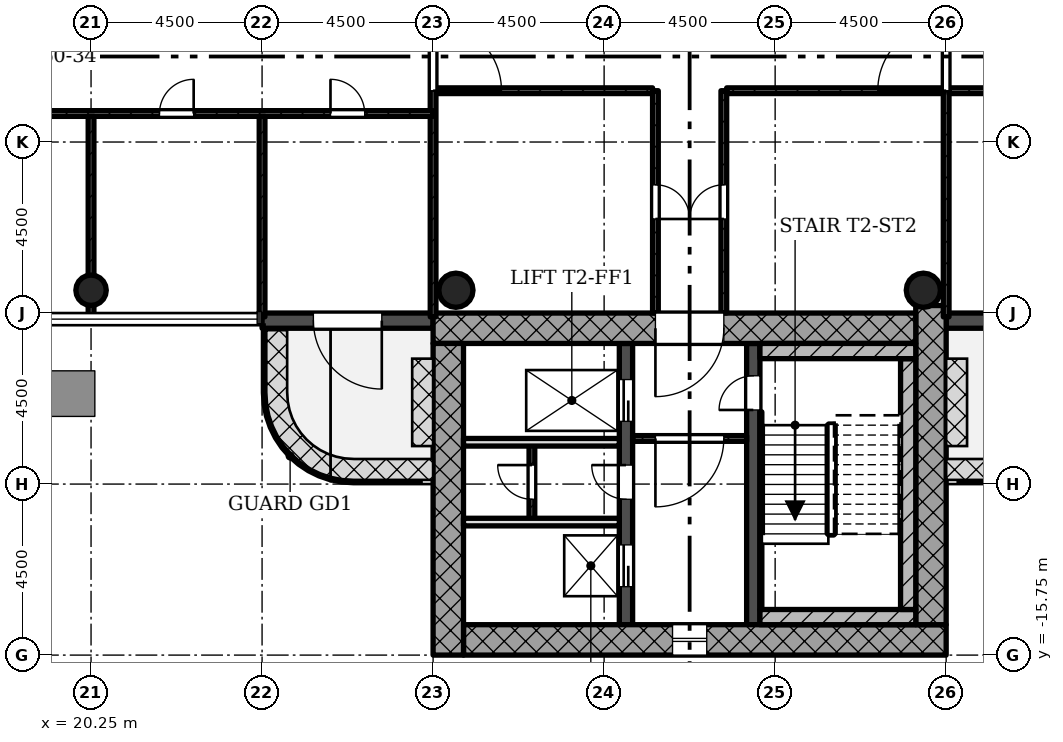
"""IFC4 building model, lengths in metres.
Left out: names, types, materials, properties, quantities, classifications, styles, units other than length and angle.
Written with IfcOpenShell. Run it as: python <this file> out.ifc"""

import sys

from ifc_helpers import new_model, si_unit, direction, frame, frame_2d, origin, origin_2d, place, context, subcontext, project, spatial, rectangle, hollow_circle, extrude, element, fill, save


model = new_model("IFC4")
c1 = context("Model", 3, precision=1e-05, world=origin(), true_north=direction((0.0, 1.0)))
c2 = subcontext(c1, "Body", "Model", "MODEL_VIEW")
j1 = project(units=[si_unit("LENGTHUNIT", "METRE"), si_unit("PLANEANGLEUNIT", "RADIAN")], contexts=[c1])
p1 = place(None, origin())
s1 = spatial("IfcSite", under=j1, at=p1, CompositionType="ELEMENT")
p2 = place(p1, origin())
s2 = spatial("IfcBuilding", under=s1, at=p2, CompositionType="ELEMENT")
p3 = place(p2, frame((0.0, 0.0, 181.3)))
s3 = spatial("IfcBuildingStorey", under=s2, at=p3, CompositionType="ELEMENT", Elevation=181.3)
p4 = place(p3, frame((30.05, -15.35, 0.0), z_axis=(0.0, 0.0, 1.0), x_axis=(1.0, 0.0, 0.0)))
e1 = element("IfcWall", 1, at=p4, inside=s3, PredefinedType="SHEAR", context=c2, shape_type="SweptSolid", body=[
    extrude(rectangle(XDim=12.7, YDim=0.8, at=frame_2d((6.35, 0.0))), origin(), (0.0, 0.0, 1.0), 4.5),
])
p5 = place(p4, frame((5.5, 0.0, 0.45)))
e2 = element("IfcOpeningElement", 2, at=p5, cuts=e1, PredefinedType="OPENING", context=c2, shape_type="SweptSolid", body=[
    extrude(rectangle(XDim=0.9, YDim=2.4, at=frame_2d((0.45, 1.2))), frame((0.0, 0.41, 0.0), z_axis=(0.0, -1.0, 0.0), x_axis=(1.0, 0.0, 0.0)), (0.0, 0.0, 1.0), 0.82),
])
p6 = place(p3, frame((42.35, -14.95, 0.0), z_axis=(0.0, 0.0, 1.0), x_axis=(0.0, 1.0, 0.0)))
e3 = element("IfcWall", 3, at=p6, inside=s3, PredefinedType="SHEAR", context=c2, shape_type="SweptSolid", body=[
    extrude(rectangle(XDim=8.398, YDim=0.8, at=frame_2d((4.199, 0.0))), origin(), (0.0, 0.0, 1.0), 4.5),
])
p7 = place(p3, frame((41.95, -7.15, 0.0), z_axis=(0.0, 0.0, 1.0), x_axis=(-1.0, 0.0, 0.0)))
e4 = element("IfcWall", 4, at=p7, inside=s3, PredefinedType="SHEAR", context=c2, shape_type="SweptSolid", body=[
    extrude(rectangle(XDim=12.7, YDim=0.8, at=frame_2d((6.35, 0.0))), origin(), (0.0, 0.0, 1.0), 4.5),
])
p8 = place(p7, frame((5.05, 0.0, 0.0)))
e5 = element("IfcOpeningElement", 5, at=p8, cuts=e4, PredefinedType="OPENING", context=c2, shape_type="SweptSolid", body=[
    extrude(rectangle(XDim=1.8, YDim=2.1, at=frame_2d((0.9, 1.05))), frame((0.0, 0.41, 0.0), z_axis=(0.0, -1.0, 0.0), x_axis=(1.0, 0.0, 0.0)), (0.0, 0.0, 1.0), 0.82),
])
p9 = place(p3, frame((29.65, -7.55, 0.0), z_axis=(0.0, 0.0, 1.0), x_axis=(0.0, -1.0, 0.0)))
e6 = element("IfcWall", 6, at=p9, inside=s3, PredefinedType="SHEAR", context=c2, shape_type="SweptSolid", body=[
    extrude(rectangle(XDim=8.2, YDim=0.8, at=frame_2d((4.1, 0.0))), origin(), (0.0, 0.0, 1.0), 4.5),
])
p10 = place(p3, frame((34.325, -14.95, 0.0), z_axis=(0.0, 0.0, 1.0), x_axis=(0.0, 1.0, 0.0)))
e7 = element("IfcWall", 7, at=p10, inside=s3, PredefinedType="SHEAR", context=c2, shape_type="SweptSolid", body=[
    extrude(rectangle(XDim=7.4, YDim=0.35, at=frame_2d((3.7, 0.0))), origin(), (0.0, 0.0, 1.0), 4.5),
])
p11 = place(p10, frame((5.35, 0.0, 0.0)))
e8 = element("IfcOpeningElement", 8, at=p11, cuts=e7, PredefinedType="OPENING", context=c2, shape_type="SweptSolid", body=[
    extrude(rectangle(XDim=1.1, YDim=2.1, at=frame_2d((0.55, 1.05))), frame((0.0, 0.185, 0.0), z_axis=(0.0, -1.0, 0.0), x_axis=(1.0, 0.0, 0.0)), (0.0, 0.0, 1.0), 0.37),
])
p12 = place(p10, frame((1.0, 0.0, 0.0)))
e9 = element("IfcOpeningElement", 9, at=p12, cuts=e7, PredefinedType="OPENING", context=c2, shape_type="SweptSolid", body=[
    extrude(rectangle(XDim=1.1, YDim=2.1, at=frame_2d((0.55, 1.05))), frame((0.0, 0.185, 0.0), z_axis=(0.0, -1.0, 0.0), x_axis=(1.0, 0.0, 0.0)), (0.0, 0.0, 1.0), 0.37),
])
p13 = place(p10, frame((3.3, 0.0, 0.0)))
e10 = element("IfcOpeningElement", 10, at=p13, cuts=e7, PredefinedType="OPENING", context=c2, shape_type="SweptSolid", body=[
    extrude(rectangle(XDim=0.9, YDim=2.1, at=frame_2d((0.45, 1.05))), frame((0.0, 0.185, 0.0), z_axis=(0.0, -1.0, 0.0), x_axis=(1.0, 0.0, 0.0)), (0.0, 0.0, 1.0), 0.37),
])
p14 = place(p3, frame((37.675, -14.95, 0.0), z_axis=(0.0, 0.0, 1.0), x_axis=(0.0, 1.0, 0.0)))
e11 = element("IfcWall", 11, at=p14, inside=s3, PredefinedType="SHEAR", context=c2, shape_type="SweptSolid", body=[
    extrude(rectangle(XDim=7.4, YDim=0.35, at=frame_2d((3.7, 0.0))), origin(), (0.0, 0.0, 1.0), 4.5),
])
p15 = place(p14, frame((5.65, 0.0, 0.0)))
e12 = element("IfcOpeningElement", 12, at=p15, cuts=e11, PredefinedType="OPENING", context=c2, shape_type="SweptSolid", body=[
    extrude(rectangle(XDim=0.9, YDim=2.1, at=frame_2d((0.45, 1.05))), frame((0.0, 0.185, 0.0), z_axis=(0.0, -1.0, 0.0), x_axis=(1.0, 0.0, 0.0)), (0.0, 0.0, 1.0), 0.37),
])
p16 = place(p3, frame((20.25, -6.15, 0.0), z_axis=(0.0, 0.0, 1.0), x_axis=(1.0, 0.0, 0.0)))
e13 = element("IfcColumn", 13, at=p16, inside=s3, PredefinedType="COLUMN", context=c2, shape_type="SweptSolid", body=[
    extrude(hollow_circle(Radius=0.4, WallThickness=0.028, at=origin_2d()), origin(), (0.0, 0.0, 1.0), 4.5),
])
for number, where, z_axis, x_axis in (
    (14, (42.15, -6.15, 0.0), (0.0, 0.0, 1.0), (1.0, 0.0, 0.0)),
    (15, (29.85, -6.15, 0.0), (0.0, 0.0, 1.0), (1.0, 0.0, 0.0)),
):
    element("IfcColumn", number, at=place(p3, frame(where, z_axis=z_axis, x_axis=x_axis)), inside=s3, PredefinedType="COLUMN", context=c2, shape_type="SweptSolid", body=[
        extrude(hollow_circle(Radius=0.45, WallThickness=0.032, at=origin_2d()), origin(), (0.0, 0.0, 1.0), 4.5),
    ])
p17 = place(p3, frame((42.75, -6.95, -0.02), z_axis=(0.0, 0.0, 1.0), x_axis=(1.0, 0.0, 0.0)))
e16 = element("IfcWall", 16, at=p17, inside=s3, PredefinedType="STANDARD", context=c2, shape_type="SweptSolid", body=[
    extrude(rectangle(XDim=4.5, YDim=0.4, at=frame_2d((2.25, 0.0))), origin(), (0.0, 0.0, 1.0), 4.22),
])
p18 = place(p17, frame((1.35, 0.0, 0.02)))
e17 = element("IfcOpeningElement", 17, at=p18, cuts=e16, PredefinedType="OPENING", context=c2, shape_type="SweptSolid", body=[
    extrude(rectangle(XDim=1.8, YDim=2.1, at=frame_2d((0.9, 1.05))), frame((0.0, 0.21, 0.0), z_axis=(0.0, -1.0, 0.0), x_axis=(1.0, 0.0, 0.0)), (0.0, 0.0, 1.0), 0.42),
])
p19 = place(p3, frame((24.75, -6.95, -0.02), z_axis=(0.0, 0.0, 1.0), x_axis=(1.0, 0.0, 0.0)))
e18 = element("IfcWall", 18, at=p19, inside=s3, PredefinedType="STANDARD", context=c2, shape_type="SweptSolid", body=[
    extrude(rectangle(XDim=4.5, YDim=0.4, at=frame_2d((2.25, 0.0))), origin(), (0.0, 0.0, 1.0), 4.22),
])
p20 = place(p19, frame((1.35, 0.0, 0.02)))
e19 = element("IfcOpeningElement", 19, at=p20, cuts=e18, PredefinedType="OPENING", context=c2, shape_type="SweptSolid", body=[
    extrude(rectangle(XDim=1.8, YDim=2.1, at=frame_2d((0.9, 1.05))), frame((0.0, 0.21, 0.0), z_axis=(0.0, -1.0, 0.0), x_axis=(1.0, 0.0, 0.0)), (0.0, 0.0, 1.0), 0.42),
])
p21 = place(p3, frame((34.5, -10.05, 0.0), z_axis=(0.0, 0.0, 1.0), x_axis=(1.0, 0.0, 0.0)))
e20 = element("IfcWall", 20, at=p21, inside=s3, PredefinedType="PARTITIONING", context=c2, shape_type="SweptSolid", body=[
    extrude(rectangle(XDim=3.0, YDim=0.15, at=frame_2d((1.5, 0.0))), origin(), (0.0, 0.0, 1.0), 4.08),
])
p22 = place(p21, frame((0.6, 0.0, 0.0)))
e21 = element("IfcOpeningElement", 21, at=p22, cuts=e20, PredefinedType="OPENING", context=c2, shape_type="SweptSolid", body=[
    extrude(rectangle(XDim=1.8, YDim=2.1, at=frame_2d((0.9, 1.05))), frame((0.0, 0.085, 0.0), z_axis=(0.0, -1.0, 0.0), x_axis=(1.0, 0.0, 0.0)), (0.0, 0.0, 1.0), 0.17),
])
for number, where, z_axis, x_axis in (
    (22, (30.05, -12.25, 0.0), (0.0, 0.0, 1.0), (1.0, 0.0, 0.0)),
    (23, (30.05, -10.15, 0.0), (0.0, 0.0, 1.0), (1.0, 0.0, 0.0)),
):
    element("IfcWall", number, at=place(p3, frame(where, z_axis=z_axis, x_axis=x_axis)), inside=s3, PredefinedType="SOLIDWALL", context=c2, shape_type="SweptSolid", body=[
        extrude(rectangle(XDim=4.1, YDim=0.2, at=frame_2d((2.05, 0.0))), origin(), (0.0, 0.0, 1.0), 4.08),
    ])
p23 = place(p3, frame((31.85, -10.15, 0.0), z_axis=(0.0, 0.0, 1.0), x_axis=(0.0, -1.0, 0.0)))
e24 = element("IfcWall", 24, at=p23, inside=s3, PredefinedType="PARTITIONING", context=c2, shape_type="SweptSolid", body=[
    extrude(rectangle(XDim=2.1, YDim=0.15, at=frame_2d((1.05, 0.0))), origin(), (0.0, 0.0, 1.0), 4.08),
])
p24 = place(p23, frame((0.6, 0.0, 0.0)))
e25 = element("IfcOpeningElement", 25, at=p24, cuts=e24, PredefinedType="OPENING", context=c2, shape_type="SweptSolid", body=[
    extrude(rectangle(XDim=0.9, YDim=2.1, at=frame_2d((0.45, 1.05))), frame((0.0, 0.085, 0.0), z_axis=(0.0, -1.0, 0.0), x_axis=(1.0, 0.0, 0.0)), (0.0, 0.0, 1.0), 0.17),
])
p25 = place(p3, frame((35.1, -6.75, 0.0), z_axis=(0.0, 0.0, 1.0), x_axis=(0.0, 1.0, 0.0)))
e26 = element("IfcWall", 26, at=p25, inside=s3, PredefinedType="PARTITIONING", context=c2, shape_type="SweptSolid", body=[
    extrude(rectangle(XDim=5.85, YDim=0.15, at=frame_2d((2.925, 0.0))), origin(), (0.0, 0.0, 1.0), 4.08),
])
p26 = place(p25, frame((2.475, 0.0, 0.0)))
e27 = element("IfcOpeningElement", 27, at=p26, cuts=e26, PredefinedType="OPENING", context=c2, shape_type="SweptSolid", body=[
    extrude(rectangle(XDim=0.9, YDim=2.1, at=frame_2d((0.45, 1.05))), frame((0.0, 0.085, 0.0), z_axis=(0.0, -1.0, 0.0), x_axis=(1.0, 0.0, 0.0)), (0.0, 0.0, 1.0), 0.17),
])
p27 = place(p3, frame((35.025, -0.9, 0.0), z_axis=(0.0, 0.0, 1.0), x_axis=(-1.0, 0.0, 0.0)))
e28 = element("IfcWall", 28, at=p27, inside=s3, PredefinedType="PARTITIONING", context=c2, shape_type="SweptSolid", body=[
    extrude(rectangle(XDim=5.7, YDim=0.15, at=frame_2d((2.85, 0.0))), origin(), (0.0, 0.0, 1.0), 4.08),
])
p28 = place(p3, frame((36.9, -6.75, 0.0), z_axis=(0.0, 0.0, 1.0), x_axis=(0.0, 1.0, 0.0)))
e29 = element("IfcWall", 29, at=p28, inside=s3, PredefinedType="PARTITIONING", context=c2, shape_type="SweptSolid", body=[
    extrude(rectangle(XDim=5.85, YDim=0.15, at=frame_2d((2.925, 0.0))), origin(), (0.0, 0.0, 1.0), 4.08),
])
p29 = place(p28, frame((2.475, 0.0, 0.0)))
e30 = element("IfcOpeningElement", 30, at=p29, cuts=e29, PredefinedType="OPENING", context=c2, shape_type="SweptSolid", body=[
    extrude(rectangle(XDim=0.9, YDim=2.1, at=frame_2d((0.45, 1.05))), frame((0.0, 0.085, 0.0), z_axis=(0.0, -1.0, 0.0), x_axis=(1.0, 0.0, 0.0)), (0.0, 0.0, 1.0), 0.17),
])
p30 = place(p3, frame((42.675, -0.9, 0.0), z_axis=(0.0, 0.0, 1.0), x_axis=(-1.0, 0.0, 0.0)))
e31 = element("IfcWall", 31, at=p30, inside=s3, PredefinedType="PARTITIONING", context=c2, shape_type="SweptSolid", body=[
    extrude(rectangle(XDim=5.7, YDim=0.15, at=frame_2d((2.85, 0.0))), origin(), (0.0, 0.0, 1.0), 4.08),
])
p31 = place(p3, frame((29.25, -6.85, 0.0), z_axis=(0.0, 0.0, 1.0), x_axis=(0.0, 1.0, 0.0)))
e32 = element("IfcWall", 32, at=p31, inside=s3, PredefinedType="PARTITIONING", context=c2, shape_type="SweptSolid", body=[
    extrude(rectangle(XDim=13.7, YDim=0.15, at=frame_2d((6.85, 0.0))), origin(), (0.0, 0.0, 1.0), 4.08),
])
p32 = place(p31, frame((5.95, 0.0, 0.0)))
e33 = element("IfcOpeningElement", 33, at=p32, cuts=e32, PredefinedType="OPENING", context=c2, shape_type="SweptSolid", body=[
    extrude(rectangle(XDim=1.8, YDim=2.1, at=frame_2d((0.9, 1.05))), frame((0.0, 0.085, 0.0), z_axis=(0.0, -1.0, 0.0), x_axis=(1.0, 0.0, 0.0)), (0.0, 0.0, 1.0), 0.17),
])
p33 = place(p3, frame((29.25, -1.5, 0.0), z_axis=(0.0, 0.0, 1.0), x_axis=(-1.0, 0.0, 0.0)))
e34 = element("IfcWall", 34, at=p33, inside=s3, PredefinedType="PARTITIONING", context=c2, shape_type="SweptSolid", body=[
    extrude(rectangle(XDim=13.6, YDim=0.15, at=frame_2d((6.8, 0.0))), origin(), (0.0, 0.0, 1.0), 4.08),
])
p34 = place(p33, frame((1.8, 0.0, 0.0)))
e35 = element("IfcOpeningElement", 35, at=p34, cuts=e34, PredefinedType="OPENING", context=c2, shape_type="SweptSolid", body=[
    extrude(rectangle(XDim=0.9, YDim=2.1, at=frame_2d((0.45, 1.05))), frame((0.0, 0.085, 0.0), z_axis=(0.0, -1.0, 0.0), x_axis=(1.0, 0.0, 0.0)), (0.0, 0.0, 1.0), 0.17),
])
p35 = place(p33, frame((6.3, 0.0, 0.0)))
e36 = element("IfcOpeningElement", 36, at=p35, cuts=e34, PredefinedType="OPENING", context=c2, shape_type="SweptSolid", body=[
    extrude(rectangle(XDim=0.9, YDim=2.1, at=frame_2d((0.45, 1.05))), frame((0.0, 0.085, 0.0), z_axis=(0.0, -1.0, 0.0), x_axis=(1.0, 0.0, 0.0)), (0.0, 0.0, 1.0), 0.17),
])
p36 = place(p33, frame((10.8, 0.0, 0.0)))
e37 = element("IfcOpeningElement", 37, at=p36, cuts=e34, PredefinedType="OPENING", context=c2, shape_type="SweptSolid", body=[
    extrude(rectangle(XDim=0.9, YDim=2.1, at=frame_2d((0.45, 1.05))), frame((0.0, 0.085, 0.0), z_axis=(0.0, -1.0, 0.0), x_axis=(1.0, 0.0, 0.0)), (0.0, 0.0, 1.0), 0.17),
])
for number, where, z_axis, x_axis in (
    (38, (24.75, -1.575, 0.0), (0.0, 0.0, 1.0), (0.0, -1.0, 0.0)),
    (39, (20.25, -1.575, 0.0), (0.0, 0.0, 1.0), (0.0, -1.0, 0.0)),
):
    element("IfcWall", number, at=place(p3, frame(where, z_axis=z_axis, x_axis=x_axis)), inside=s3, PredefinedType="PARTITIONING", context=c2, shape_type="SweptSolid", body=[
        extrude(rectangle(XDim=5.275, YDim=0.15, at=frame_2d((2.638, 0.0))), origin(), (0.0, 0.0, 1.0), 4.08),
    ])
p37 = place(p3, frame((42.75, -6.85, 0.0), z_axis=(0.0, 0.0, 1.0), x_axis=(0.0, 1.0, 0.0)))
e40 = element("IfcWall", 40, at=p37, inside=s3, PredefinedType="PARTITIONING", context=c2, shape_type="SweptSolid", body=[
    extrude(rectangle(XDim=13.7, YDim=0.15, at=frame_2d((6.85, 0.0))), origin(), (0.0, 0.0, 1.0), 4.08),
])
p38 = place(p37, frame((5.95, 0.0, 0.0)))
e41 = element("IfcOpeningElement", 41, at=p38, cuts=e40, PredefinedType="OPENING", context=c2, shape_type="SweptSolid", body=[
    extrude(rectangle(XDim=1.8, YDim=2.1, at=frame_2d((0.9, 1.05))), frame((0.0, 0.085, 0.0), z_axis=(0.0, -1.0, 0.0), x_axis=(1.0, 0.0, 0.0)), (0.0, 0.0, 1.0), 0.17),
])
p39 = place(p3, frame((51.85, -0.9, 0.0), z_axis=(0.0, 0.0, 1.0), x_axis=(-1.0, 0.0, 0.0)))
e42 = element("IfcWall", 42, at=p39, inside=s3, PredefinedType="PARTITIONING", context=c2, shape_type="SweptSolid", body=[
    extrude(rectangle(XDim=9.025, YDim=0.15, at=frame_2d((4.513, 0.0))), origin(), (0.0, 0.0, 1.0), 4.08),
])
p40 = place(p39, frame((1.9, 0.0, 0.0)))
e43 = element("IfcOpeningElement", 43, at=p40, cuts=e42, PredefinedType="OPENING", context=c2, shape_type="SweptSolid", body=[
    extrude(rectangle(XDim=0.9, YDim=2.1, at=frame_2d((0.45, 1.05))), frame((0.0, 0.085, 0.0), z_axis=(0.0, -1.0, 0.0), x_axis=(1.0, 0.0, 0.0)), (0.0, 0.0, 1.0), 0.17),
])
p41 = place(p39, frame((6.4, 0.0, 0.0)))
e44 = element("IfcOpeningElement", 44, at=p41, cuts=e42, PredefinedType="OPENING", context=c2, shape_type="SweptSolid", body=[
    extrude(rectangle(XDim=0.9, YDim=2.1, at=frame_2d((0.45, 1.05))), frame((0.0, 0.085, 0.0), z_axis=(0.0, -1.0, 0.0), x_axis=(1.0, 0.0, 0.0)), (0.0, 0.0, 1.0), 0.17),
])
p42 = place(p3, frame((37.85, -14.75, 0.0), z_axis=(0.0, 0.0, 1.0), x_axis=(1.0, 0.0, 0.0)))
e45 = element("IfcWall", 45, at=p42, inside=s3, PredefinedType="SHEAR", context=c2, shape_type="SweptSolid", body=[
    extrude(rectangle(XDim=4.1, YDim=0.4, at=frame_2d((2.05, 0.0))), origin(), (0.0, 0.0, 1.0), 4.5),
])
p43 = place(p3, frame((41.75, -7.95, 0.0), z_axis=(0.0, 0.0, 1.0), x_axis=(0.0, -1.0, 0.0)))
e46 = element("IfcWall", 46, at=p43, inside=s3, PredefinedType="SHEAR", context=c2, shape_type="SweptSolid", body=[
    extrude(rectangle(XDim=6.6, YDim=0.4, at=frame_2d((3.3, 0.0))), origin(), (0.0, 0.0, 1.0), 4.5),
])
p44 = place(p3, frame((37.85, -7.75, 0.0), z_axis=(0.0, 0.0, 1.0), x_axis=(1.0, 0.0, 0.0)))
e47 = element("IfcWall", 47, at=p44, inside=s3, PredefinedType="SHEAR", context=c2, shape_type="SweptSolid", body=[
    extrude(rectangle(XDim=4.1, YDim=0.4, at=frame_2d((2.05, 0.0))), origin(), (0.0, 0.0, 1.0), 4.5),
])
p45 = place(p3, frame((37.875, -9.35, 0.0), z_axis=(0.0, 0.0, 1.0), x_axis=(0.0, -1.0, 0.0)))
e48 = element("IfcWall", 48, at=p45, inside=s3, PredefinedType="SHEAR", context=c2, shape_type="SweptSolid", body=[
    extrude(rectangle(XDim=5.2, YDim=0.05, at=frame_2d((2.6, 0.0))), origin(), (0.0, 0.0, 1.0), 4.5),
])
p46 = place(p20, origin())
e49 = element("IfcDoor", 49, at=p46, inside=s3, OperationType="SINGLE_SWING_RIGHT", PredefinedType="DOOR", context=c2, shape_type="SweptSolid", body=[
    extrude(rectangle(XDim=1.8, YDim=2.1, at=frame_2d((0.9, 1.05))), frame((0.0, 0.025, 0.0), z_axis=(0.0, -1.0, 0.0), x_axis=(1.0, 0.0, 0.0)), (0.0, 0.0, 1.0), 0.05),
])
fill(e19, e49)
p47 = place(p5, origin())
e50 = element("IfcWindow", 50, at=p47, inside=s3, PartitioningType="SINGLE_PANEL", PredefinedType="WINDOW", context=c2, shape_type="SweptSolid", body=[
    extrude(rectangle(XDim=0.9, YDim=2.4, at=frame_2d((0.45, 1.2))), frame((0.0, 0.03, 0.0), z_axis=(0.0, -1.0, 0.0), x_axis=(1.0, 0.0, 0.0)), (0.0, 0.0, 1.0), 0.06),
])
fill(e2, e50)
p48 = place(p22, origin())
e51 = element("IfcDoor", 51, at=p48, inside=s3, OperationType="SINGLE_SWING_LEFT", PredefinedType="DOOR", context=c2, shape_type="SweptSolid", body=[
    extrude(rectangle(XDim=1.8, YDim=2.1, at=frame_2d((0.9, 1.05))), frame((0.0, 0.025, 0.0), z_axis=(0.0, -1.0, 0.0), x_axis=(1.0, 0.0, 0.0)), (0.0, 0.0, 1.0), 0.05),
])
fill(e21, e51)
p49 = place(p24, origin())
e52 = element("IfcDoor", 52, at=p49, inside=s3, OperationType="SINGLE_SWING_LEFT", PredefinedType="DOOR", context=c2, shape_type="SweptSolid", body=[
    extrude(rectangle(XDim=0.9, YDim=2.1, at=frame_2d((0.45, 1.05))), frame((0.0, 0.025, 0.0), z_axis=(0.0, -1.0, 0.0), x_axis=(1.0, 0.0, 0.0)), (0.0, 0.0, 1.0), 0.05),
])
fill(e25, e52)
p50 = place(p26, origin())
e53 = element("IfcDoor", 53, at=p50, inside=s3, OperationType="SINGLE_SWING_LEFT", PredefinedType="DOOR", context=c2, shape_type="SweptSolid", body=[
    extrude(rectangle(XDim=0.9, YDim=2.1, at=frame_2d((0.45, 1.05))), frame((0.0, 0.025, 0.0), z_axis=(0.0, -1.0, 0.0), x_axis=(1.0, 0.0, 0.0)), (0.0, 0.0, 1.0), 0.05),
])
fill(e27, e53)
p51 = place(p29, origin())
e54 = element("IfcDoor", 54, at=p51, inside=s3, OperationType="SINGLE_SWING_RIGHT", PredefinedType="DOOR", context=c2, shape_type="SweptSolid", body=[
    extrude(rectangle(XDim=0.9, YDim=2.1, at=frame_2d((0.45, 1.05))), frame((0.0, 0.025, 0.0), z_axis=(0.0, -1.0, 0.0), x_axis=(1.0, 0.0, 0.0)), (0.0, 0.0, 1.0), 0.05),
])
fill(e30, e54)
p52 = place(p32, origin())
e55 = element("IfcDoor", 55, at=p52, inside=s3, OperationType="SINGLE_SWING_LEFT", PredefinedType="DOOR", context=c2, shape_type="SweptSolid", body=[
    extrude(rectangle(XDim=1.8, YDim=2.1, at=frame_2d((0.9, 1.05))), frame((0.0, 0.025, 0.0), z_axis=(0.0, -1.0, 0.0), x_axis=(1.0, 0.0, 0.0)), (0.0, 0.0, 1.0), 0.05),
])
fill(e33, e55)
p53 = place(p34, origin())
e56 = element("IfcDoor", 56, at=p53, inside=s3, OperationType="SINGLE_SWING_RIGHT", PredefinedType="DOOR", context=c2, shape_type="SweptSolid", body=[
    extrude(rectangle(XDim=0.9, YDim=2.1, at=frame_2d((0.45, 1.05))), frame((0.0, 0.025, 0.0), z_axis=(0.0, -1.0, 0.0), x_axis=(1.0, 0.0, 0.0)), (0.0, 0.0, 1.0), 0.05),
])
fill(e35, e56)
p54 = place(p35, origin())
e57 = element("IfcDoor", 57, at=p54, inside=s3, OperationType="SINGLE_SWING_LEFT", PredefinedType="DOOR", context=c2, shape_type="SweptSolid", body=[
    extrude(rectangle(XDim=0.9, YDim=2.1, at=frame_2d((0.45, 1.05))), frame((0.0, 0.025, 0.0), z_axis=(0.0, -1.0, 0.0), x_axis=(1.0, 0.0, 0.0)), (0.0, 0.0, 1.0), 0.05),
])
fill(e36, e57)
p55 = place(p38, origin())
e58 = element("IfcDoor", 58, at=p55, inside=s3, OperationType="SINGLE_SWING_RIGHT", PredefinedType="DOOR", context=c2, shape_type="SweptSolid", body=[
    extrude(rectangle(XDim=1.8, YDim=2.1, at=frame_2d((0.9, 1.05))), frame((0.0, 0.025, 0.0), z_axis=(0.0, -1.0, 0.0), x_axis=(1.0, 0.0, 0.0)), (0.0, 0.0, 1.0), 0.05),
])
fill(e41, e58)
p56 = place(p15, origin())
e59 = element("IfcDoor", 59, at=p56, inside=s3, OperationType="SINGLE_SWING_RIGHT", PredefinedType="DOOR", context=c2, shape_type="SweptSolid", body=[
    extrude(rectangle(XDim=0.9, YDim=2.1, at=frame_2d((0.45, 1.05))), frame((0.0, 0.025, 0.0), z_axis=(0.0, -1.0, 0.0), x_axis=(1.0, 0.0, 0.0)), (0.0, 0.0, 1.0), 0.05),
])
fill(e12, e59)
p57 = place(p11, origin())
e60 = element("IfcDoor", 60, at=p57, inside=s3, OperationType="SLIDING_TO_LEFT", PredefinedType="DOOR", context=c2, shape_type="SweptSolid", body=[
    extrude(rectangle(XDim=1.1, YDim=2.1, at=frame_2d((0.55, 1.05))), frame((0.0, 0.025, 0.0), z_axis=(0.0, -1.0, 0.0), x_axis=(1.0, 0.0, 0.0)), (0.0, 0.0, 1.0), 0.05),
])
fill(e8, e60)
p58 = place(p12, origin())
e61 = element("IfcDoor", 61, at=p58, inside=s3, OperationType="SLIDING_TO_LEFT", PredefinedType="DOOR", context=c2, shape_type="SweptSolid", body=[
    extrude(rectangle(XDim=1.1, YDim=2.1, at=frame_2d((0.55, 1.05))), frame((0.0, 0.025, 0.0), z_axis=(0.0, -1.0, 0.0), x_axis=(1.0, 0.0, 0.0)), (0.0, 0.0, 1.0), 0.05),
])
fill(e9, e61)
p59 = place(p13, origin())
e62 = element("IfcDoor", 62, at=p59, inside=s3, OperationType="SINGLE_SWING_LEFT", PredefinedType="DOOR", context=c2, shape_type="SweptSolid", body=[
    extrude(rectangle(XDim=0.9, YDim=2.1, at=frame_2d((0.45, 1.05))), frame((0.0, 0.025, 0.0), z_axis=(0.0, -1.0, 0.0), x_axis=(1.0, 0.0, 0.0)), (0.0, 0.0, 1.0), 0.05),
])
fill(e10, e62)
p60 = place(p8, origin())
e63 = element("IfcDoor", 63, at=p60, inside=s3, OperationType="SINGLE_SWING_LEFT", PredefinedType="DOOR", context=c2, shape_type="SweptSolid", body=[
    extrude(rectangle(XDim=1.8, YDim=2.1, at=frame_2d((0.9, 1.05))), frame((0.0, 0.025, 0.0), z_axis=(0.0, -1.0, 0.0), x_axis=(1.0, 0.0, 0.0)), (0.0, 0.0, 1.0), 0.05),
])
fill(e5, e63)
save(model, sys.argv[1])
